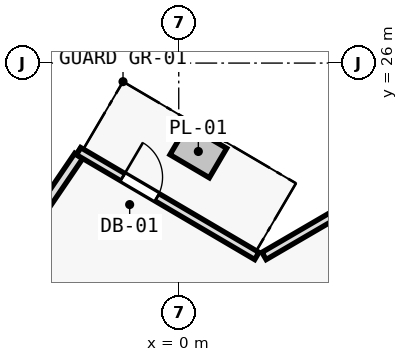
"""IFC4 building model, lengths in metres.
Left out: names, types, materials, properties, quantities, classifications, styles, units other than length and angle.
Written with IfcOpenShell. Run it as: python <this file> out.ifc"""

import sys

from ifc_helpers import new_model, si_unit, direction, frame, frame_2d, origin, place, context, subcontext, project, spatial, rectangle, extrude, element, fill, save


model = new_model("IFC4")
c1 = context("Model", 3, precision=1e-05, world=origin(), true_north=direction((0.0, 1.0)))
c2 = subcontext(c1, "Body", "Model", "MODEL_VIEW")
j1 = project(units=[si_unit("LENGTHUNIT", "METRE"), si_unit("PLANEANGLEUNIT", "RADIAN")], contexts=[c1])
p1 = place(None, origin())
s1 = spatial("IfcSite", under=j1, at=p1, CompositionType="ELEMENT")
p2 = place(p1, origin())
s2 = spatial("IfcBuilding", under=s1, at=p2, CompositionType="ELEMENT")
p3 = place(p2, frame((0.0, 0.0, 40.8)))
s3 = spatial("IfcBuildingStorey", under=s2, at=p3, CompositionType="ELEMENT", Elevation=40.8)
p4 = place(p3, frame((-9.684, 13.191, 0.0), z_axis=(0.0, 0.0, 1.0), x_axis=(0.562473549685, 0.826815279192, 0.0)))
e1 = element("IfcWall", 1, at=p4, inside=s3, PredefinedType="SOLIDWALL", context=c2, shape_type="SweptSolid", body=[
    extrude(rectangle(XDim=12.536, YDim=0.25, at=frame_2d((6.268, 0.0))), origin(), (0.0, 0.0, 1.0), 3.35),
])
p5 = place(p4, frame((5.718, 0.0, 0.62)))
e2 = element("IfcOpeningElement", 2, at=p5, cuts=e1, PredefinedType="OPENING", context=c2, shape_type="SweptSolid", body=[
    extrude(rectangle(XDim=1.1, YDim=1.8, at=frame_2d((0.55, 0.9))), frame((0.0, 0.135, 0.0), z_axis=(0.0, -1.0, 0.0), x_axis=(1.0, 0.0, 0.0)), (0.0, 0.0, 1.0), 0.27),
])
p6 = place(p3, frame((2.245, 20.925, 0.0), z_axis=(0.0, 0.0, 1.0), x_axis=(0.863967641515, 0.503547330858, 0.0)))
e3 = element("IfcWall", 3, at=p6, inside=s3, PredefinedType="SOLIDWALL", context=c2, shape_type="SweptSolid", body=[
    extrude(rectangle(XDim=4.925, YDim=0.22, at=frame_2d((2.462, 0.0))), origin(), (0.0, 0.0, 1.0), 3.35),
])
p7 = place(p3, frame((-2.635, 23.681, 0.0), z_axis=(0.0, 0.0, 1.0), x_axis=(0.862126841454, -0.506692519428, 0.0)))
e4 = element("IfcWall", 4, at=p7, inside=s3, PredefinedType="SOLIDWALL", context=c2, shape_type="SweptSolid", body=[
    extrude(rectangle(XDim=5.439, YDim=0.22, at=frame_2d((2.72, 0.0))), origin(), (0.0, 0.0, 1.0), 3.35),
])
p8 = place(p7, frame((1.345, 0.0, 0.0)))
e5 = element("IfcOpeningElement", 5, at=p8, cuts=e4, PredefinedType="OPENING", context=c2, shape_type="SweptSolid", body=[
    extrude(rectangle(XDim=1.05, YDim=2.15, at=frame_2d((0.525, 1.075))), frame((0.0, 0.12, 0.0), z_axis=(0.0, -1.0, 0.0), x_axis=(1.0, 0.0, 0.0)), (0.0, 0.0, 1.0), 0.24),
])
p9 = place(p8, origin())
e6 = element("IfcDoor", 6, at=p9, inside=s3, OperationType="SINGLE_SWING_LEFT", PredefinedType="DOOR", context=c2, shape_type="SweptSolid", body=[
    extrude(rectangle(XDim=1.05, YDim=2.15, at=frame_2d((0.525, 1.075))), frame((0.0, 0.025, 0.0), z_axis=(0.0, -1.0, 0.0), x_axis=(1.0, 0.0, 0.0)), (0.0, 0.0, 1.0), 0.05),
])
fill(e5, e6)
save(model, sys.argv[1])
